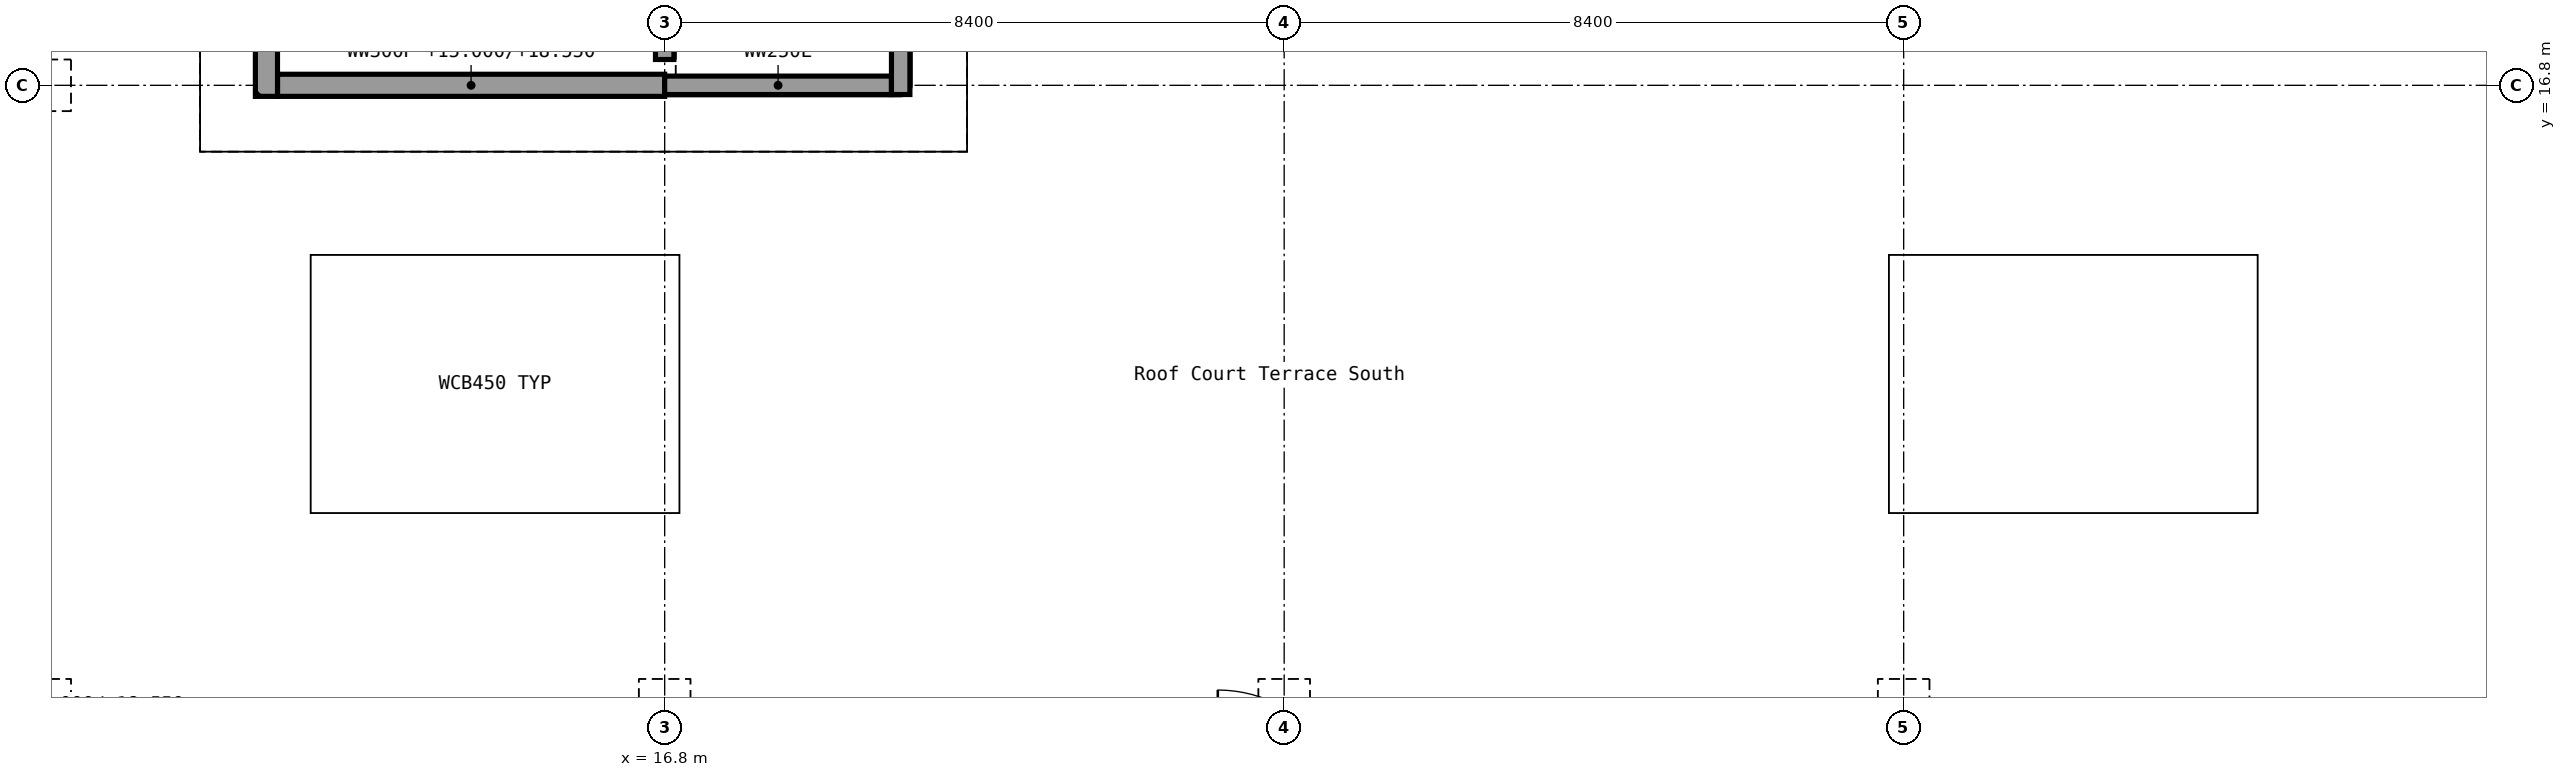
"""IFC4 building model, lengths in metres.
Left out: names, types, materials, properties, quantities, classifications, styles, units other than length and angle.
Written with IfcOpenShell. Run it as: python <this file> out.ifc"""

import sys

from ifc_helpers import new_model, si_unit, direction, frame, frame_2d, origin, origin_2d, place, context, subcontext, project, spatial, rectangle, extrude, element, save


model = new_model("IFC4")
c1 = context("Model", 3, precision=1e-05, world=origin(), true_north=direction((0.0, 1.0)))
c2 = subcontext(c1, "Body", "Model", "MODEL_VIEW")
j1 = project(units=[si_unit("LENGTHUNIT", "METRE"), si_unit("PLANEANGLEUNIT", "RADIAN")], contexts=[c1])
p1 = place(None, origin())
s1 = spatial("IfcSite", under=j1, at=p1, CompositionType="ELEMENT")
p2 = place(p1, origin())
s2 = spatial("IfcBuilding", under=s1, at=p2, CompositionType="ELEMENT")
p3 = place(p2, frame((0.0, 0.0, 15.0)))
s3 = spatial("IfcBuildingStorey", under=s2, at=p3, CompositionType="ELEMENT", Elevation=15.0)
for number, where, z_axis, x_axis in (
    (1, (8.4, 8.4, 0.0), (0.0, 0.0, 1.0), (1.0, 0.0, 0.0)),
    (2, (8.4, 16.8, 0.0), (0.0, 0.0, 1.0), (1.0, 0.0, 0.0)),
    (3, (16.8, 8.4, 0.0), (0.0, 0.0, 1.0), (1.0, 0.0, 0.0)),
    (4, (25.2, 8.4, 0.0), (0.0, 0.0, 1.0), (1.0, 0.0, 0.0)),
    (5, (33.6, 8.4, 0.0), (0.0, 0.0, 1.0), (1.0, 0.0, 0.0)),
):
    element("IfcColumn", number, at=place(p3, frame(where, z_axis=z_axis, x_axis=x_axis)), inside=s3, PredefinedType="COLUMN", context=c2, shape_type="SweptSolid", body=[
        extrude(rectangle(XDim=0.7, YDim=0.7, at=origin_2d()), origin(), (0.0, 0.0, 1.0), 4.5),
    ])
p4 = place(p3, frame((11.55, 16.8, 0.0), z_axis=(0.0, 0.0, 1.0), x_axis=(1.0, 0.0, 0.0)))
e6 = element("IfcWall", 6, at=p4, inside=s3, PredefinedType="SOLIDWALL", context=c2, shape_type="SweptSolid", body=[
    extrude(rectangle(XDim=5.25, YDim=0.3, at=frame_2d((2.625, 0.0))), origin(), (0.0, 0.0, 1.0), 3.55),
])
p5 = place(p3, frame((16.8, 16.8, 0.0), z_axis=(0.0, 0.0, 1.0), x_axis=(1.0, 0.0, 0.0)))
e7 = element("IfcWall", 7, at=p5, inside=s3, PredefinedType="SHEAR", context=c2, shape_type="SweptSolid", body=[
    extrude(rectangle(XDim=3.075, YDim=0.25, at=frame_2d((1.538, 0.0))), origin(), (0.0, 0.0, 1.0), 4.15),
])
p6 = place(p3, frame((11.4, 16.65, 0.0), z_axis=(0.0, 0.0, 1.0), x_axis=(0.0, 1.0, 0.0)))
e8 = element("IfcWall", 8, at=p6, inside=s3, PredefinedType="SOLIDWALL", context=c2, shape_type="SweptSolid", body=[
    extrude(rectangle(XDim=11.3, YDim=0.3, at=frame_2d((5.65, 0.0))), origin(), (0.0, 0.0, 1.0), 3.55),
])
p7 = place(p6, frame((7.65, 0.0, 0.0)))
e9 = element("IfcOpeningElement", 9, at=p7, cuts=e8, PredefinedType="OPENING", context=c2, shape_type="SweptSolid", body=[
    extrude(rectangle(XDim=1.8, YDim=2.4, at=frame_2d((0.9, 1.2))), frame((0.0, 0.15, 0.0), z_axis=(0.0, -1.0, 0.0), x_axis=(1.0, 0.0, 0.0)), (0.0, 0.0, 1.0), 0.3),
])
p8 = place(p3, frame((16.8, 17.15, 0.0), z_axis=(0.0, 0.0, 1.0), x_axis=(0.0, 1.0, 0.0)))
e10 = element("IfcWall", 10, at=p8, inside=s3, PredefinedType="SHEAR", context=c2, shape_type="SweptSolid", body=[
    extrude(rectangle(XDim=2.45, YDim=0.25, at=frame_2d((1.225, 0.0))), origin(), (0.0, 0.0, 1.0), 4.15),
])
p9 = place(p8, frame((0.675, 0.0, 0.0)))
e11 = element("IfcOpeningElement", 11, at=p9, cuts=e10, PredefinedType="OPENING", context=c2, shape_type="SweptSolid", body=[
    extrude(rectangle(XDim=1.1, YDim=2.1, at=frame_2d((0.55, 1.05))), frame((0.0, 0.125, 0.0), z_axis=(0.0, -1.0, 0.0), x_axis=(1.0, 0.0, 0.0)), (0.0, 0.0, 1.0), 0.25),
])
p10 = place(p3, frame((20.0, 16.675, 0.0), z_axis=(0.0, 0.0, 1.0), x_axis=(0.0, 1.0, 0.0)))
e12 = element("IfcWall", 12, at=p10, inside=s3, PredefinedType="SHEAR", context=c2, shape_type="SweptSolid", body=[
    extrude(rectangle(XDim=2.925, YDim=0.25, at=frame_2d((1.462, 0.0))), origin(), (0.0, 0.0, 1.0), 4.15),
])
save(model, sys.argv[1])
